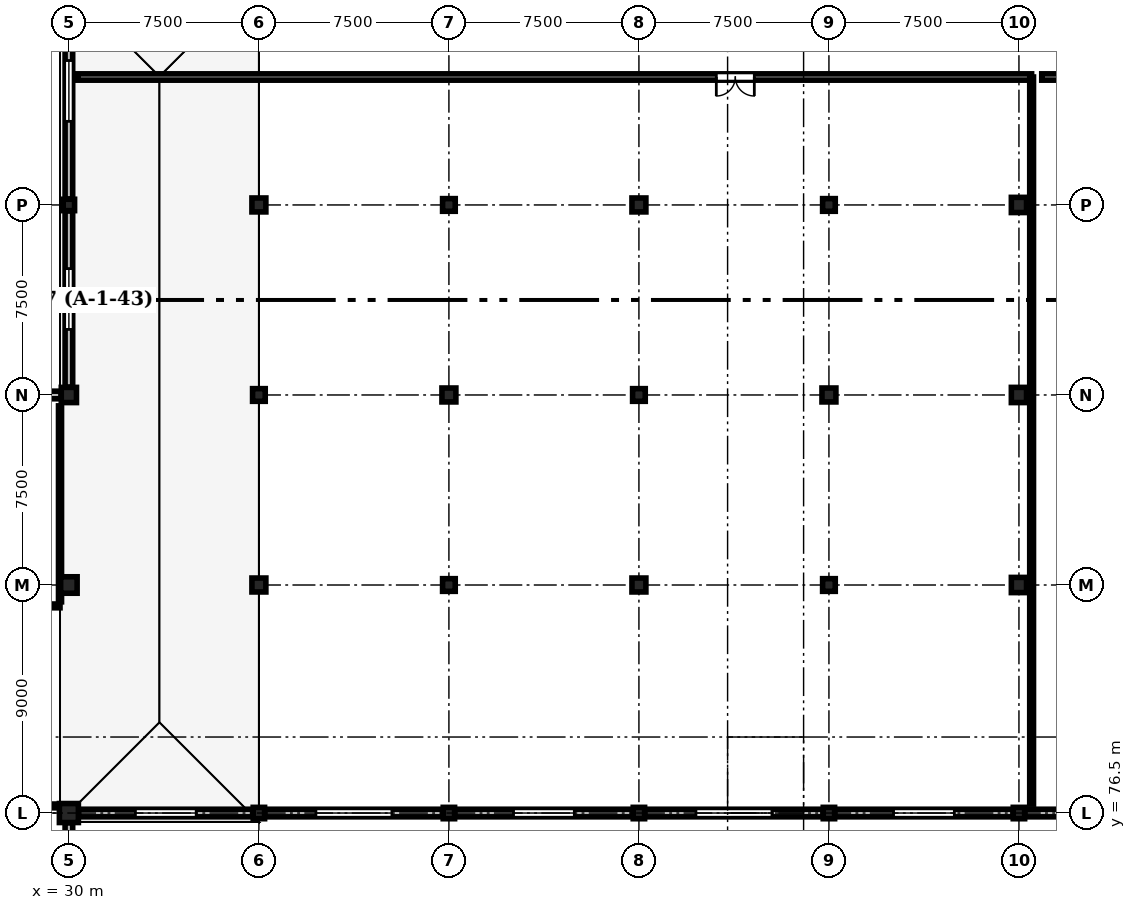
"""IFC4 building model, lengths in metres.
Left out: names, types, materials, properties, quantities, classifications, styles, units other than length and angle.
Written with IfcOpenShell. Run it as: python <this file> out.ifc"""

import sys

from ifc_helpers import new_model, si_unit, direction, frame, frame_2d, origin, origin_2d, place, context, subcontext, project, spatial, rectangle, circle, extrude, element, fill, save


model = new_model("IFC4")
c1 = context("Model", 3, precision=1e-05, world=origin(), true_north=direction((0.0, 1.0)))
c2 = subcontext(c1, "Body", "Model", "MODEL_VIEW")
j1 = project(units=[si_unit("LENGTHUNIT", "METRE"), si_unit("PLANEANGLEUNIT", "RADIAN")], contexts=[c1])
p1 = place(None, origin())
s1 = spatial("IfcSite", under=j1, at=p1, CompositionType="ELEMENT")
p2 = place(p1, origin())
s2 = spatial("IfcBuilding", under=s1, at=p2, CompositionType="ELEMENT")
p3 = place(p2, frame((0.0, 0.0, 14.1)))
s3 = spatial("IfcBuildingStorey", under=s2, at=p3, CompositionType="ELEMENT", Elevation=14.1)
p4 = place(p3, frame((30.0, 76.5, 0.0), z_axis=(0.0, 0.0, 1.0), x_axis=(1.0, 0.0, 0.0)))
e1 = element("IfcColumn", 1, at=p4, inside=s3, PredefinedType="COLUMN", context=c2, shape_type="SweptSolid", body=[
    extrude(rectangle(XDim=0.75, YDim=0.75, at=origin_2d()), origin(), (0.0, 0.0, 1.0), 3.75),
])
p5 = place(p3, frame((30.0, 85.5, 0.0), z_axis=(0.0, 0.0, 1.0), x_axis=(1.0, 0.0, 0.0)))
e2 = element("IfcColumn", 2, at=p5, inside=s3, PredefinedType="COLUMN", context=c2, shape_type="SweptSolid", body=[
    extrude(rectangle(XDim=0.65, YDim=0.65, at=origin_2d()), origin(), (0.0, 0.0, 1.0), 3.75),
])
p6 = place(p3, frame((30.0, 93.0, 0.0), z_axis=(0.0, 0.0, 1.0), x_axis=(1.0, 0.0, 0.0)))
e3 = element("IfcColumn", 3, at=p6, inside=s3, PredefinedType="COLUMN", context=c2, shape_type="SweptSolid", body=[
    extrude(rectangle(XDim=0.6, YDim=0.6, at=origin_2d()), origin(), (0.0, 0.0, 1.0), 3.75),
])
for number, where, z_axis, x_axis in (
    (4, (30.0, 100.5, 0.0), (0.0, 0.0, 1.0), (1.0, 0.0, 0.0)),
    (5, (37.5, 76.5, 0.0), (0.0, 0.0, 1.0), (1.0, 0.0, 0.0)),
):
    element("IfcColumn", number, at=place(p3, frame(where, z_axis=z_axis, x_axis=x_axis)), inside=s3, PredefinedType="COLUMN", context=c2, shape_type="SweptSolid", body=[
        extrude(rectangle(XDim=0.45, YDim=0.45, at=origin_2d()), origin(), (0.0, 0.0, 1.0), 3.75),
    ])
p7 = place(p3, frame((37.5, 85.5, 0.0), z_axis=(0.0, 0.0, 1.0), x_axis=(1.0, 0.0, 0.0)))
e6 = element("IfcColumn", 6, at=p7, inside=s3, PredefinedType="COLUMN", context=c2, shape_type="SweptSolid", body=[
    extrude(rectangle(XDim=0.55, YDim=0.55, at=origin_2d()), origin(), (0.0, 0.0, 1.0), 3.75),
])
p8 = place(p3, frame((37.5, 93.0, 0.0), z_axis=(0.0, 0.0, 1.0), x_axis=(1.0, 0.0, 0.0)))
e7 = element("IfcColumn", 7, at=p8, inside=s3, PredefinedType="COLUMN", context=c2, shape_type="SweptSolid", body=[
    extrude(rectangle(XDim=0.5, YDim=0.5, at=origin_2d()), origin(), (0.0, 0.0, 1.0), 3.75),
])
p9 = place(p3, frame((37.5, 100.5, 0.0), z_axis=(0.0, 0.0, 1.0), x_axis=(1.0, 0.0, 0.0)))
e8 = element("IfcColumn", 8, at=p9, inside=s3, PredefinedType="COLUMN", context=c2, shape_type="SweptSolid", body=[
    extrude(rectangle(XDim=0.55, YDim=0.55, at=origin_2d()), origin(), (0.0, 0.0, 1.0), 3.75),
])
p10 = place(p3, frame((45.0, 76.5, 0.0), z_axis=(0.0, 0.0, 1.0), x_axis=(1.0, 0.0, 0.0)))
e9 = element("IfcColumn", 9, at=p10, inside=s3, PredefinedType="COLUMN", context=c2, shape_type="SweptSolid", body=[
    extrude(rectangle(XDim=0.45, YDim=0.45, at=origin_2d()), origin(), (0.0, 0.0, 1.0), 3.75),
])
p11 = place(p3, frame((45.0, 85.5, 0.0), z_axis=(0.0, 0.0, 1.0), x_axis=(1.0, 0.0, 0.0)))
e10 = element("IfcColumn", 10, at=p11, inside=s3, PredefinedType="COLUMN", context=c2, shape_type="SweptSolid", body=[
    extrude(rectangle(XDim=0.5, YDim=0.5, at=origin_2d()), origin(), (0.0, 0.0, 1.0), 3.75),
])
p12 = place(p3, frame((45.0, 93.0, 0.0), z_axis=(0.0, 0.0, 1.0), x_axis=(1.0, 0.0, 0.0)))
e11 = element("IfcColumn", 11, at=p12, inside=s3, PredefinedType="COLUMN", context=c2, shape_type="SweptSolid", body=[
    extrude(rectangle(XDim=0.55, YDim=0.55, at=origin_2d()), origin(), (0.0, 0.0, 1.0), 3.75),
])
p13 = place(p3, frame((45.0, 100.5, 0.0), z_axis=(0.0, 0.0, 1.0), x_axis=(1.0, 0.0, 0.0)))
e12 = element("IfcColumn", 12, at=p13, inside=s3, PredefinedType="COLUMN", context=c2, shape_type="SweptSolid", body=[
    extrude(rectangle(XDim=0.5, YDim=0.5, at=origin_2d()), origin(), (0.0, 0.0, 1.0), 3.75),
])
p14 = place(p3, frame((52.5, 76.5, 0.0), z_axis=(0.0, 0.0, 1.0), x_axis=(1.0, 0.0, 0.0)))
e13 = element("IfcColumn", 13, at=p14, inside=s3, PredefinedType="COLUMN", context=c2, shape_type="SweptSolid", body=[
    extrude(rectangle(XDim=0.45, YDim=0.45, at=origin_2d()), origin(), (0.0, 0.0, 1.0), 3.75),
])
p15 = place(p3, frame((52.5, 85.5, 0.0), z_axis=(0.0, 0.0, 1.0), x_axis=(1.0, 0.0, 0.0)))
e14 = element("IfcColumn", 14, at=p15, inside=s3, PredefinedType="COLUMN", context=c2, shape_type="SweptSolid", body=[
    extrude(rectangle(XDim=0.55, YDim=0.55, at=origin_2d()), origin(), (0.0, 0.0, 1.0), 3.75),
])
p16 = place(p3, frame((52.5, 93.0, 0.0), z_axis=(0.0, 0.0, 1.0), x_axis=(1.0, 0.0, 0.0)))
e15 = element("IfcColumn", 15, at=p16, inside=s3, PredefinedType="COLUMN", context=c2, shape_type="SweptSolid", body=[
    extrude(rectangle(XDim=0.5, YDim=0.5, at=origin_2d()), origin(), (0.0, 0.0, 1.0), 3.75),
])
p17 = place(p3, frame((52.5, 100.5, 0.0), z_axis=(0.0, 0.0, 1.0), x_axis=(1.0, 0.0, 0.0)))
e16 = element("IfcColumn", 16, at=p17, inside=s3, PredefinedType="COLUMN", context=c2, shape_type="SweptSolid", body=[
    extrude(rectangle(XDim=0.55, YDim=0.55, at=origin_2d()), origin(), (0.0, 0.0, 1.0), 3.75),
])
p18 = place(p3, frame((60.0, 76.5, 0.0), z_axis=(0.0, 0.0, 1.0), x_axis=(1.0, 0.0, 0.0)))
e17 = element("IfcColumn", 17, at=p18, inside=s3, PredefinedType="COLUMN", context=c2, shape_type="SweptSolid", body=[
    extrude(rectangle(XDim=0.45, YDim=0.45, at=origin_2d()), origin(), (0.0, 0.0, 1.0), 3.75),
])
p19 = place(p3, frame((60.0, 85.5, 0.0), z_axis=(0.0, 0.0, 1.0), x_axis=(1.0, 0.0, 0.0)))
e18 = element("IfcColumn", 18, at=p19, inside=s3, PredefinedType="COLUMN", context=c2, shape_type="SweptSolid", body=[
    extrude(rectangle(XDim=0.5, YDim=0.5, at=origin_2d()), origin(), (0.0, 0.0, 1.0), 3.75),
])
p20 = place(p3, frame((60.0, 93.0, 0.0), z_axis=(0.0, 0.0, 1.0), x_axis=(1.0, 0.0, 0.0)))
e19 = element("IfcColumn", 19, at=p20, inside=s3, PredefinedType="COLUMN", context=c2, shape_type="SweptSolid", body=[
    extrude(rectangle(XDim=0.55, YDim=0.55, at=origin_2d()), origin(), (0.0, 0.0, 1.0), 3.75),
])
p21 = place(p3, frame((60.0, 100.5, 0.0), z_axis=(0.0, 0.0, 1.0), x_axis=(1.0, 0.0, 0.0)))
e20 = element("IfcColumn", 20, at=p21, inside=s3, PredefinedType="COLUMN", context=c2, shape_type="SweptSolid", body=[
    extrude(rectangle(XDim=0.5, YDim=0.5, at=origin_2d()), origin(), (0.0, 0.0, 1.0), 3.75),
])
p22 = place(p3, frame((67.5, 76.5, 0.0), z_axis=(0.0, 0.0, 1.0), x_axis=(1.0, 0.0, 0.0)))
e21 = element("IfcColumn", 21, at=p22, inside=s3, PredefinedType="COLUMN", context=c2, shape_type="SweptSolid", body=[
    extrude(rectangle(XDim=0.45, YDim=0.45, at=origin_2d()), origin(), (0.0, 0.0, 1.0), 3.75),
])
p23 = place(p3, frame((67.5, 85.5, 0.0), z_axis=(0.0, 0.0, 1.0), x_axis=(1.0, 0.0, 0.0)))
e22 = element("IfcColumn", 22, at=p23, inside=s3, PredefinedType="COLUMN", context=c2, shape_type="SweptSolid", body=[
    extrude(rectangle(XDim=0.6, YDim=0.6, at=origin_2d()), origin(), (0.0, 0.0, 1.0), 3.75),
])
p24 = place(p3, frame((67.5, 93.0, 0.0), z_axis=(0.0, 0.0, 1.0), x_axis=(1.0, 0.0, 0.0)))
e23 = element("IfcColumn", 23, at=p24, inside=s3, PredefinedType="COLUMN", context=c2, shape_type="SweptSolid", body=[
    extrude(circle(Radius=0.3, at=origin_2d()), origin(), (0.0, 0.0, 1.0), 3.75),
])
p25 = place(p3, frame((67.5, 100.5, 0.0), z_axis=(0.0, 0.0, 1.0), x_axis=(1.0, 0.0, 0.0)))
e24 = element("IfcColumn", 24, at=p25, inside=s3, PredefinedType="COLUMN", context=c2, shape_type="SweptSolid", body=[
    extrude(rectangle(XDim=0.6, YDim=0.6, at=origin_2d()), origin(), (0.0, 0.0, 1.0), 3.75),
])
p26 = place(p3, frame((30.0, 76.115, 0.0), z_axis=(0.0, 0.0, 1.0), x_axis=(0.0, -1.0, 0.0)))
e25 = element("IfcWall", 25, at=p26, inside=s3, PredefinedType="STANDARD", context=c2, shape_type="SweptSolid", body=[
    extrude(rectangle(XDim=6.945, YDim=0.3, at=frame_2d((3.473, 0.0))), origin(), (0.0, 0.0, 1.0), 2.87),
])
p27 = place(p26, frame((2.873, 0.0, 0.9)))
e26 = element("IfcOpeningElement", 26, at=p27, cuts=e25, PredefinedType="OPENING", context=c2, shape_type="SweptSolid", body=[
    extrude(rectangle(XDim=1.2, YDim=1.69, at=frame_2d((0.6, 0.845))), frame((0.0, 0.16, 0.0), z_axis=(0.0, -1.0, 0.0), x_axis=(1.0, 0.0, 0.0)), (0.0, 0.0, 1.0), 0.32),
])
p28 = place(p3, frame((22.81, 93.0, 0.0), z_axis=(0.0, 0.0, 1.0), x_axis=(1.0, 0.0, 0.0)))
e27 = element("IfcWall", 27, at=p28, inside=s3, PredefinedType="STANDARD", context=c2, shape_type="SweptSolid", body=[
    extrude(rectangle(XDim=6.88, YDim=0.3, at=frame_2d((3.44, 0.0))), origin(), (0.0, 0.0, 1.0), 2.87),
])
p29 = place(p28, frame((2.24, 0.0, 0.9)))
e28 = element("IfcOpeningElement", 28, at=p29, cuts=e27, PredefinedType="OPENING", context=c2, shape_type="SweptSolid", body=[
    extrude(rectangle(XDim=2.4, YDim=1.69, at=frame_2d((1.2, 0.845))), frame((0.0, 0.16, 0.0), z_axis=(0.0, -1.0, 0.0), x_axis=(1.0, 0.0, 0.0)), (0.0, 0.0, 1.0), 0.32),
])
p30 = place(p3, frame((37.265, 76.5, 0.0), z_axis=(0.0, 0.0, 1.0), x_axis=(-1.0, 0.0, 0.0)))
e29 = element("IfcWall", 29, at=p30, inside=s3, PredefinedType="STANDARD", context=c2, shape_type="SweptSolid", body=[
    extrude(rectangle(XDim=6.88, YDim=0.3, at=frame_2d((3.44, 0.0))), origin(), (0.0, 0.0, 1.0), 3.47),
])
p31 = place(p30, frame((2.24, 0.0, 1.1)))
e30 = element("IfcOpeningElement", 30, at=p31, cuts=e29, PredefinedType="OPENING", context=c2, shape_type="SweptSolid", body=[
    extrude(rectangle(XDim=2.4, YDim=1.2, at=frame_2d((1.2, 0.6))), frame((0.0, 0.16, 0.0), z_axis=(0.0, -1.0, 0.0), x_axis=(1.0, 0.0, 0.0)), (0.0, 0.0, 1.0), 0.32),
])
p32 = place(p3, frame((30.0, 93.31, 0.0), z_axis=(0.0, 0.0, 1.0), x_axis=(0.0, 1.0, 0.0)))
e31 = element("IfcWall", 31, at=p32, inside=s3, PredefinedType="STANDARD", context=c2, shape_type="SweptSolid", body=[
    extrude(rectangle(XDim=6.955, YDim=0.3, at=frame_2d((3.478, 0.0))), origin(), (0.0, 0.0, 1.0), 3.47),
])
p33 = place(p32, frame((2.278, 0.0, 1.1)))
e32 = element("IfcOpeningElement", 32, at=p33, cuts=e31, PredefinedType="OPENING", context=c2, shape_type="SweptSolid", body=[
    extrude(rectangle(XDim=2.4, YDim=1.2, at=frame_2d((1.2, 0.6))), frame((0.0, 0.16, 0.0), z_axis=(0.0, -1.0, 0.0), x_axis=(1.0, 0.0, 0.0)), (0.0, 0.0, 1.0), 0.32),
])
p34 = place(p3, frame((30.0, 100.735, 0.0), z_axis=(0.0, 0.0, 1.0), x_axis=(0.0, 1.0, 0.0)))
e33 = element("IfcWall", 33, at=p34, inside=s3, PredefinedType="STANDARD", context=c2, shape_type="SweptSolid", body=[
    extrude(rectangle(XDim=8.53, YDim=0.3, at=frame_2d((4.265, 0.0))), origin(), (0.0, 0.0, 1.0), 3.47),
])
p35 = place(p34, frame((3.065, 0.0, 1.1)))
e34 = element("IfcOpeningElement", 34, at=p35, cuts=e33, PredefinedType="OPENING", context=c2, shape_type="SweptSolid", body=[
    extrude(rectangle(XDim=2.4, YDim=1.2, at=frame_2d((1.2, 0.6))), frame((0.0, 0.16, 0.0), z_axis=(0.0, -1.0, 0.0), x_axis=(1.0, 0.0, 0.0)), (0.0, 0.0, 1.0), 0.32),
])
p36 = place(p3, frame((44.765, 76.5, 0.0), z_axis=(0.0, 0.0, 1.0), x_axis=(-1.0, 0.0, 0.0)))
e35 = element("IfcWall", 35, at=p36, inside=s3, PredefinedType="STANDARD", context=c2, shape_type="SweptSolid", body=[
    extrude(rectangle(XDim=7.03, YDim=0.3, at=frame_2d((3.515, 0.0))), origin(), (0.0, 0.0, 1.0), 2.87),
])
p37 = place(p36, frame((2.015, 0.0, 1.1)))
e36 = element("IfcOpeningElement", 36, at=p37, cuts=e35, PredefinedType="OPENING", context=c2, shape_type="SweptSolid", body=[
    extrude(rectangle(XDim=3.0, YDim=1.2, at=frame_2d((1.5, 0.6))), frame((0.0, 0.16, 0.0), z_axis=(0.0, -1.0, 0.0), x_axis=(1.0, 0.0, 0.0)), (0.0, 0.0, 1.0), 0.32),
])
p38 = place(p3, frame((52.265, 76.5, 0.0), z_axis=(0.0, 0.0, 1.0), x_axis=(-1.0, 0.0, 0.0)))
e37 = element("IfcWall", 37, at=p38, inside=s3, PredefinedType="STANDARD", context=c2, shape_type="SweptSolid", body=[
    extrude(rectangle(XDim=7.03, YDim=0.3, at=frame_2d((3.515, 0.0))), origin(), (0.0, 0.0, 1.0), 2.87),
])
p39 = place(p38, frame((2.315, 0.0, 1.1)))
e38 = element("IfcOpeningElement", 38, at=p39, cuts=e37, PredefinedType="OPENING", context=c2, shape_type="SweptSolid", body=[
    extrude(rectangle(XDim=2.4, YDim=1.2, at=frame_2d((1.2, 0.6))), frame((0.0, 0.16, 0.0), z_axis=(0.0, -1.0, 0.0), x_axis=(1.0, 0.0, 0.0)), (0.0, 0.0, 1.0), 0.32),
])
p40 = place(p3, frame((59.765, 76.5, 0.0), z_axis=(0.0, 0.0, 1.0), x_axis=(-1.0, 0.0, 0.0)))
e39 = element("IfcWall", 39, at=p40, inside=s3, PredefinedType="STANDARD", context=c2, shape_type="SweptSolid", body=[
    extrude(rectangle(XDim=7.03, YDim=0.3, at=frame_2d((3.515, 0.0))), origin(), (0.0, 0.0, 1.0), 2.87),
])
p41 = place(p40, frame((2.015, 0.0, 1.1)))
e40 = element("IfcOpeningElement", 40, at=p41, cuts=e39, PredefinedType="OPENING", context=c2, shape_type="SweptSolid", body=[
    extrude(rectangle(XDim=3.0, YDim=1.2, at=frame_2d((1.5, 0.6))), frame((0.0, 0.16, 0.0), z_axis=(0.0, -1.0, 0.0), x_axis=(1.0, 0.0, 0.0)), (0.0, 0.0, 1.0), 0.32),
])
p42 = place(p3, frame((67.265, 76.5, 0.0), z_axis=(0.0, 0.0, 1.0), x_axis=(-1.0, 0.0, 0.0)))
e41 = element("IfcWall", 41, at=p42, inside=s3, PredefinedType="STANDARD", context=c2, shape_type="SweptSolid", body=[
    extrude(rectangle(XDim=7.03, YDim=0.3, at=frame_2d((3.515, 0.0))), origin(), (0.0, 0.0, 1.0), 2.87),
])
p43 = place(p42, frame((2.315, 0.0, 1.1)))
e42 = element("IfcOpeningElement", 42, at=p43, cuts=e41, PredefinedType="OPENING", context=c2, shape_type="SweptSolid", body=[
    extrude(rectangle(XDim=2.4, YDim=1.2, at=frame_2d((1.2, 0.6))), frame((0.0, 0.16, 0.0), z_axis=(0.0, -1.0, 0.0), x_axis=(1.0, 0.0, 0.0)), (0.0, 0.0, 1.0), 0.32),
])
p44 = place(p3, frame((74.765, 76.5, 0.0), z_axis=(0.0, 0.0, 1.0), x_axis=(-1.0, 0.0, 0.0)))
e43 = element("IfcWall", 43, at=p44, inside=s3, PredefinedType="STANDARD", context=c2, shape_type="SweptSolid", body=[
    extrude(rectangle(XDim=7.03, YDim=0.3, at=frame_2d((3.515, 0.0))), origin(), (0.0, 0.0, 1.0), 2.87),
])
p45 = place(p44, frame((2.015, 0.0, 1.1)))
e44 = element("IfcOpeningElement", 44, at=p45, cuts=e43, PredefinedType="OPENING", context=c2, shape_type="SweptSolid", body=[
    extrude(rectangle(XDim=3.0, YDim=1.2, at=frame_2d((1.5, 0.6))), frame((0.0, 0.16, 0.0), z_axis=(0.0, -1.0, 0.0), x_axis=(1.0, 0.0, 0.0)), (0.0, 0.0, 1.0), 0.32),
])
p46 = place(p3, frame((68.0, 105.55, 0.0), z_axis=(0.0, 0.0, 1.0), x_axis=(-1.0, 0.0, 0.0)))
e45 = element("IfcWall", 45, at=p46, inside=s3, PredefinedType="STANDARD", context=c2, shape_type="SweptSolid", body=[
    extrude(rectangle(XDim=37.65, YDim=0.25, at=frame_2d((18.825, 0.0))), origin(), (0.0, 0.0, 1.0), 3.455),
])
p47 = place(p46, frame((10.945, 0.0, 0.0)))
e46 = element("IfcOpeningElement", 46, at=p47, cuts=e45, PredefinedType="OPENING", context=c2, shape_type="SweptSolid", body=[
    extrude(rectangle(XDim=1.5, YDim=2.3, at=frame_2d((0.75, 1.15))), frame((0.0, 0.135, 0.0), z_axis=(0.0, -1.0, 0.0), x_axis=(1.0, 0.0, 0.0)), (0.0, 0.0, 1.0), 0.27),
])
p48 = place(p3, frame((106.0, 105.55, 0.0), z_axis=(0.0, 0.0, 1.0), x_axis=(-1.0, 0.0, 0.0)))
e47 = element("IfcWall", 47, at=p48, inside=s3, PredefinedType="STANDARD", context=c2, shape_type="SweptSolid", body=[
    extrude(rectangle(XDim=37.6, YDim=0.25, at=frame_2d((18.8, 0.0))), origin(), (0.0, 0.0, 1.0), 3.455),
])
p49 = place(p48, frame((3.81, 0.0, 0.0)))
e48 = element("IfcOpeningElement", 48, at=p49, cuts=e47, PredefinedType="OPENING", context=c2, shape_type="SweptSolid", body=[
    extrude(rectangle(XDim=1.5, YDim=2.3, at=frame_2d((0.75, 1.15))), frame((0.0, 0.135, 0.0), z_axis=(0.0, -1.0, 0.0), x_axis=(1.0, 0.0, 0.0)), (0.0, 0.0, 1.0), 0.27),
])
p50 = place(p3, frame((18.45, 76.78, 0.0), z_axis=(0.0, 0.0, 1.0), x_axis=(1.0, 0.0, 0.0)))
e49 = element("IfcWall", 49, at=p50, inside=s3, PredefinedType="PARTITIONING", context=c2, shape_type="SweptSolid", body=[
    extrude(rectangle(XDim=11.2, YDim=0.15, at=frame_2d((5.6, 0.0))), origin(), (0.0, 0.0, 1.0), 2.855),
])
p51 = place(p3, frame((18.45, 84.675, 0.0), z_axis=(0.0, 0.0, 1.0), x_axis=(1.0, 0.0, 0.0)))
e50 = element("IfcWall", 50, at=p51, inside=s3, PredefinedType="PARTITIONING", context=c2, shape_type="SweptSolid", body=[
    extrude(rectangle(XDim=11.2, YDim=0.15, at=frame_2d((5.6, 0.0))), origin(), (0.0, 0.0, 1.0), 3.455),
])
p52 = place(p3, frame((68.0, 76.85, 0.0), z_axis=(0.0, 0.0, 1.0), x_axis=(0.0, 1.0, 0.0)))
e51 = element("IfcWall", 51, at=p52, inside=s3, PredefinedType="PARTITIONING", context=c2, shape_type="SweptSolid", body=[
    extrude(rectangle(XDim=28.7, YDim=0.15, at=frame_2d((14.35, 0.0))), origin(), (0.0, 0.0, 1.0), 3.455),
])
p53 = place(p3, frame((29.65, 84.835, 0.0), z_axis=(0.0, 0.0, 1.0), x_axis=(0.0, 1.0, 0.0)))
e52 = element("IfcWall", 52, at=p53, inside=s3, PredefinedType="PARTITIONING", context=c2, shape_type="SweptSolid", body=[
    extrude(rectangle(XDim=7.735, YDim=0.12, at=frame_2d((3.868, 0.0))), origin(), (0.0, 0.0, 1.0), 2.855),
])
p54 = place(p31, origin())
e53 = element("IfcWindow", 53, at=p54, inside=s3, PartitioningType="SINGLE_PANEL", PredefinedType="WINDOW", context=c2, shape_type="SweptSolid", body=[
    extrude(rectangle(XDim=2.4, YDim=1.2, at=frame_2d((1.2, 0.6))), frame((0.0, 0.03, 0.0), z_axis=(0.0, -1.0, 0.0), x_axis=(1.0, 0.0, 0.0)), (0.0, 0.0, 1.0), 0.06),
])
fill(e30, e53)
p55 = place(p33, origin())
e54 = element("IfcWindow", 54, at=p55, inside=s3, PartitioningType="SINGLE_PANEL", PredefinedType="WINDOW", context=c2, shape_type="SweptSolid", body=[
    extrude(rectangle(XDim=2.4, YDim=1.2, at=frame_2d((1.2, 0.6))), frame((0.0, 0.03, 0.0), z_axis=(0.0, -1.0, 0.0), x_axis=(1.0, 0.0, 0.0)), (0.0, 0.0, 1.0), 0.06),
])
fill(e32, e54)
p56 = place(p35, origin())
e55 = element("IfcWindow", 55, at=p56, inside=s3, PartitioningType="SINGLE_PANEL", PredefinedType="WINDOW", context=c2, shape_type="SweptSolid", body=[
    extrude(rectangle(XDim=2.4, YDim=1.2, at=frame_2d((1.2, 0.6))), frame((0.0, 0.03, 0.0), z_axis=(0.0, -1.0, 0.0), x_axis=(1.0, 0.0, 0.0)), (0.0, 0.0, 1.0), 0.06),
])
fill(e34, e55)
p57 = place(p37, origin())
e56 = element("IfcWindow", 56, at=p57, inside=s3, PartitioningType="SINGLE_PANEL", PredefinedType="WINDOW", context=c2, shape_type="SweptSolid", body=[
    extrude(rectangle(XDim=3.0, YDim=1.2, at=frame_2d((1.5, 0.6))), frame((0.0, 0.03, 0.0), z_axis=(0.0, -1.0, 0.0), x_axis=(1.0, 0.0, 0.0)), (0.0, 0.0, 1.0), 0.06),
])
fill(e36, e56)
p58 = place(p39, origin())
e57 = element("IfcWindow", 57, at=p58, inside=s3, PartitioningType="SINGLE_PANEL", PredefinedType="WINDOW", context=c2, shape_type="SweptSolid", body=[
    extrude(rectangle(XDim=2.4, YDim=1.2, at=frame_2d((1.2, 0.6))), frame((0.0, 0.03, 0.0), z_axis=(0.0, -1.0, 0.0), x_axis=(1.0, 0.0, 0.0)), (0.0, 0.0, 1.0), 0.06),
])
fill(e38, e57)
p59 = place(p41, origin())
e58 = element("IfcWindow", 58, at=p59, inside=s3, PartitioningType="SINGLE_PANEL", PredefinedType="WINDOW", context=c2, shape_type="SweptSolid", body=[
    extrude(rectangle(XDim=3.0, YDim=1.2, at=frame_2d((1.5, 0.6))), frame((0.0, 0.03, 0.0), z_axis=(0.0, -1.0, 0.0), x_axis=(1.0, 0.0, 0.0)), (0.0, 0.0, 1.0), 0.06),
])
fill(e40, e58)
p60 = place(p43, origin())
e59 = element("IfcWindow", 59, at=p60, inside=s3, PartitioningType="SINGLE_PANEL", PredefinedType="WINDOW", context=c2, shape_type="SweptSolid", body=[
    extrude(rectangle(XDim=2.4, YDim=1.2, at=frame_2d((1.2, 0.6))), frame((0.0, 0.03, 0.0), z_axis=(0.0, -1.0, 0.0), x_axis=(1.0, 0.0, 0.0)), (0.0, 0.0, 1.0), 0.06),
])
fill(e42, e59)
p61 = place(p47, origin())
e60 = element("IfcDoor", 60, at=p61, inside=s3, OperationType="DOUBLE_DOOR_SINGLE_SWING", PredefinedType="DOOR", context=c2, shape_type="SweptSolid", body=[
    extrude(rectangle(XDim=1.5, YDim=2.3, at=frame_2d((0.75, 1.15))), frame((0.0, 0.025, 0.0), z_axis=(0.0, -1.0, 0.0), x_axis=(1.0, 0.0, 0.0)), (0.0, 0.0, 1.0), 0.05),
])
fill(e46, e60)
save(model, sys.argv[1])
